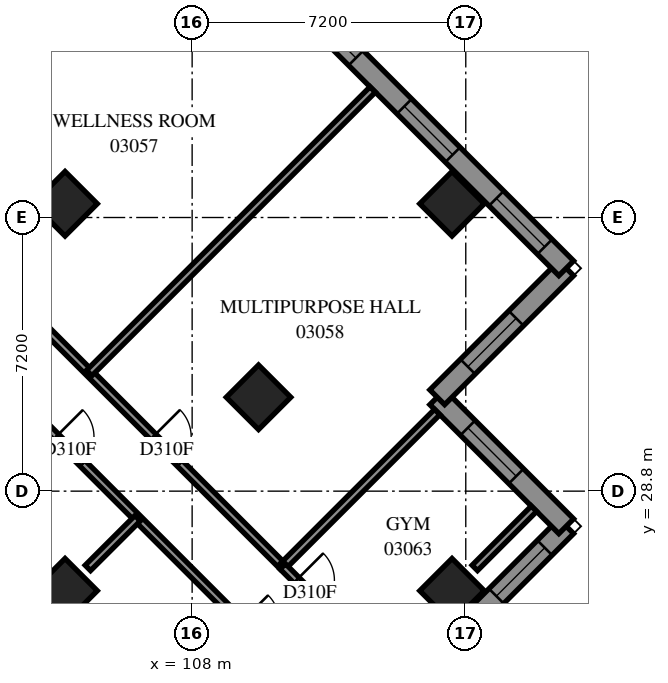
"""IFC4 building model, lengths in metres.
Left out: names, types, materials, properties, quantities, classifications, styles, units other than length and angle.
Written with IfcOpenShell. Run it as: python <this file> out.ifc"""

import sys

from ifc_helpers import new_model, si_unit, direction, frame, frame_2d, origin, origin_2d, place, context, subcontext, project, spatial, polyline, rectangle, outline, extrude, element, fill, save


model = new_model("IFC4")
c1 = context("Model", 3, precision=1e-05, world=origin(), true_north=direction((0.0, 1.0)))
c2 = subcontext(c1, "Body", "Model", "MODEL_VIEW")
j1 = project(units=[si_unit("LENGTHUNIT", "METRE"), si_unit("PLANEANGLEUNIT", "RADIAN")], contexts=[c1])
p1 = place(None, origin())
s1 = spatial("IfcSite", under=j1, at=p1, CompositionType="ELEMENT")
p2 = place(p1, origin())
s2 = spatial("IfcBuilding", under=s1, at=p2, CompositionType="ELEMENT")
p3 = place(p2, frame((0.0, 0.0, 14.4)))
s3 = spatial("IfcBuildingStorey", under=s2, at=p3, CompositionType="ELEMENT", Elevation=14.4)
for number, where, z_axis, x_axis in (
    (1, (104.656, 36.362, 0.0), (0.0, 0.0, 1.0), (0.707, -0.707, 0.0)),
    (2, (114.838, 36.362, 0.0), (0.0, 0.0, 1.0), (0.707, -0.707, 0.0)),
    (3, (109.747, 31.271, 0.0), (0.0, 0.0, 1.0), (0.707, -0.707, 0.0)),
    (4, (104.656, 26.18, 0.0), (0.0, 0.0, 1.0), (0.707, -0.707, 0.0)),
    (5, (114.838, 26.18, 0.0), (0.0, 0.0, 1.0), (0.707, -0.707, 0.0)),
):
    element("IfcColumn", number, at=place(p3, frame(where, z_axis=z_axis, x_axis=x_axis)), inside=s3, PredefinedType="COLUMN", context=c2, shape_type="SweptSolid", body=[
        extrude(rectangle(XDim=1.2, YDim=1.2, at=origin_2d()), origin(), (0.0, 0.0, 1.0), 3.8),
    ])
p4 = place(p3, frame((104.656, 14.689, 0.0), z_axis=(0.0, 0.0, 1.0), x_axis=(0.7071094621, 0.7071041002, 0.0)))
e6 = element("IfcWall", 6, at=p4, inside=s3, PredefinedType="SOLIDWALL", context=c2, shape_type="SweptSolid", body=[
    extrude(outline(polyline([(-0.275, -0.275), (18.925, -0.275), (18.375, 0.275), (0.275, 0.275), (-0.275, -0.275)])), origin(), (0.0, 0.0, 1.0), 3.8),
])
p5 = place(p4, frame((1.825, 0.0, 0.7)))
e7 = element("IfcOpeningElement", 7, at=p5, cuts=e6, PredefinedType="OPENING", context=c2, shape_type="SweptSolid", body=[
    extrude(rectangle(XDim=1.8, YDim=2.6, at=frame_2d((0.9, 1.3))), frame((0.0, 0.285, 0.0), z_axis=(0.0, -1.0, 0.0), x_axis=(1.0, 0.0, 0.0)), (0.0, 0.0, 1.0), 0.57),
])
p6 = place(p4, frame((5.425, 0.0, 0.7)))
e8 = element("IfcOpeningElement", 8, at=p6, cuts=e6, PredefinedType="OPENING", context=c2, shape_type="SweptSolid", body=[
    extrude(rectangle(XDim=1.8, YDim=2.6, at=frame_2d((0.9, 1.3))), frame((0.0, 0.285, 0.0), z_axis=(0.0, -1.0, 0.0), x_axis=(1.0, 0.0, 0.0)), (0.0, 0.0, 1.0), 0.57),
])
p7 = place(p4, frame((8.875, 0.0, 0.7)))
e9 = element("IfcOpeningElement", 9, at=p7, cuts=e6, PredefinedType="OPENING", context=c2, shape_type="SweptSolid", body=[
    extrude(rectangle(XDim=1.8, YDim=2.6, at=frame_2d((0.9, 1.3))), frame((0.0, 0.285, 0.0), z_axis=(0.0, -1.0, 0.0), x_axis=(1.0, 0.0, 0.0)), (0.0, 0.0, 1.0), 0.57),
])
p8 = place(p4, frame((12.775, 0.0, 0.7)))
e10 = element("IfcOpeningElement", 10, at=p8, cuts=e6, PredefinedType="OPENING", context=c2, shape_type="SweptSolid", body=[
    extrude(rectangle(XDim=1.8, YDim=2.6, at=frame_2d((0.9, 1.3))), frame((0.0, 0.285, 0.0), z_axis=(0.0, -1.0, 0.0), x_axis=(1.0, 0.0, 0.0)), (0.0, 0.0, 1.0), 0.57),
])
p9 = place(p4, frame((16.05, 0.0, 0.7)))
e11 = element("IfcOpeningElement", 11, at=p9, cuts=e6, PredefinedType="OPENING", context=c2, shape_type="SweptSolid", body=[
    extrude(rectangle(XDim=1.8, YDim=2.6, at=frame_2d((0.9, 1.3))), frame((0.0, 0.285, 0.0), z_axis=(0.0, -1.0, 0.0), x_axis=(1.0, 0.0, 0.0)), (0.0, 0.0, 1.0), 0.57),
])
p10 = place(p3, frame((117.843, 27.877, 0.0), z_axis=(0.0, 0.0, 1.0), x_axis=(-0.7071067812, 0.7071067812, 0.0)))
e12 = element("IfcWall", 12, at=p10, inside=s3, PredefinedType="SOLIDWALL", context=c2, shape_type="SweptSolid", body=[
    extrude(outline(polyline([(-0.275, -0.275), (4.525, -0.275), (5.075, 0.275), (0.275, 0.275), (-0.275, -0.275)])), origin(), (0.0, 0.0, 1.0), 3.8),
])
p11 = place(p10, frame((1.863, 0.0, 0.7)))
e13 = element("IfcOpeningElement", 13, at=p11, cuts=e12, PredefinedType="OPENING", context=c2, shape_type="SweptSolid", body=[
    extrude(rectangle(XDim=1.8, YDim=2.6, at=frame_2d((0.9, 1.3))), frame((0.0, 0.285, 0.0), z_axis=(0.0, -1.0, 0.0), x_axis=(1.0, 0.0, 0.0)), (0.0, 0.0, 1.0), 0.57),
])
p12 = place(p3, frame((114.449, 31.271, 0.0), z_axis=(0.0, 0.0, 1.0), x_axis=(0.7070963646, 0.7071171977, 0.0)))
e14 = element("IfcWall", 14, at=p12, inside=s3, PredefinedType="SOLIDWALL", context=c2, shape_type="SweptSolid", body=[
    extrude(outline(polyline([(0.275, -0.275), (5.075, -0.275), (4.525, 0.275), (-0.275, 0.275), (0.275, -0.275)])), origin(), (0.0, 0.0, 1.0), 3.8),
])
p13 = place(p12, frame((1.137, 0.0, 0.7)))
e15 = element("IfcOpeningElement", 15, at=p13, cuts=e14, PredefinedType="OPENING", context=c2, shape_type="SweptSolid", body=[
    extrude(rectangle(XDim=1.8, YDim=2.6, at=frame_2d((0.9, 1.3))), frame((0.0, 0.285, 0.0), z_axis=(0.0, -1.0, 0.0), x_axis=(1.0, 0.0, 0.0)), (0.0, 0.0, 1.0), 0.57),
])
p14 = place(p3, frame((117.843, 34.665, 0.0), z_axis=(0.0, 0.0, 1.0), x_axis=(-0.7071067812, 0.7071067812, 0.0)))
e16 = element("IfcWall", 16, at=p14, inside=s3, PredefinedType="SOLIDWALL", context=c2, shape_type="SweptSolid", body=[
    extrude(outline(polyline([(-0.275, -0.275), (54.222, -0.275), (53.994, 0.275), (0.275, 0.275), (-0.275, -0.275)])), origin(), (0.0, 0.0, 1.0), 3.8),
])
p15 = place(p14, frame((0.8, 0.0, 0.7)))
e17 = element("IfcOpeningElement", 17, at=p15, cuts=e16, PredefinedType="OPENING", context=c2, shape_type="SweptSolid", body=[
    extrude(rectangle(XDim=1.8, YDim=2.6, at=frame_2d((0.9, 1.3))), frame((0.0, 0.285, 0.0), z_axis=(0.0, -1.0, 0.0), x_axis=(1.0, 0.0, 0.0)), (0.0, 0.0, 1.0), 0.57),
])
p16 = place(p14, frame((4.225, 0.0, 0.7)))
e18 = element("IfcOpeningElement", 18, at=p16, cuts=e16, PredefinedType="OPENING", context=c2, shape_type="SweptSolid", body=[
    extrude(rectangle(XDim=1.8, YDim=2.6, at=frame_2d((0.9, 1.3))), frame((0.0, 0.285, 0.0), z_axis=(0.0, -1.0, 0.0), x_axis=(1.0, 0.0, 0.0)), (0.0, 0.0, 1.0), 0.57),
])
p17 = place(p14, frame((7.825, 0.0, 0.7)))
e19 = element("IfcOpeningElement", 19, at=p17, cuts=e16, PredefinedType="OPENING", context=c2, shape_type="SweptSolid", body=[
    extrude(rectangle(XDim=1.8, YDim=2.6, at=frame_2d((0.9, 1.3))), frame((0.0, 0.285, 0.0), z_axis=(0.0, -1.0, 0.0), x_axis=(1.0, 0.0, 0.0)), (0.0, 0.0, 1.0), 0.57),
])
p18 = place(p14, frame((11.425, 0.0, 0.7)))
e20 = element("IfcOpeningElement", 20, at=p18, cuts=e16, PredefinedType="OPENING", context=c2, shape_type="SweptSolid", body=[
    extrude(rectangle(XDim=1.8, YDim=2.6, at=frame_2d((0.9, 1.3))), frame((0.0, 0.285, 0.0), z_axis=(0.0, -1.0, 0.0), x_axis=(1.0, 0.0, 0.0)), (0.0, 0.0, 1.0), 0.57),
])
p19 = place(p14, frame((15.025, 0.0, 0.7)))
e21 = element("IfcOpeningElement", 21, at=p19, cuts=e16, PredefinedType="OPENING", context=c2, shape_type="SweptSolid", body=[
    extrude(rectangle(XDim=1.8, YDim=2.6, at=frame_2d((0.9, 1.3))), frame((0.0, 0.285, 0.0), z_axis=(0.0, -1.0, 0.0), x_axis=(1.0, 0.0, 0.0)), (0.0, 0.0, 1.0), 0.57),
])
p20 = place(p14, frame((18.625, 0.0, 0.7)))
e22 = element("IfcOpeningElement", 22, at=p20, cuts=e16, PredefinedType="OPENING", context=c2, shape_type="SweptSolid", body=[
    extrude(rectangle(XDim=1.8, YDim=2.6, at=frame_2d((0.9, 1.3))), frame((0.0, 0.285, 0.0), z_axis=(0.0, -1.0, 0.0), x_axis=(1.0, 0.0, 0.0)), (0.0, 0.0, 1.0), 0.57),
])
p21 = place(p14, frame((22.225, 0.0, 0.7)))
e23 = element("IfcOpeningElement", 23, at=p21, cuts=e16, PredefinedType="OPENING", context=c2, shape_type="SweptSolid", body=[
    extrude(rectangle(XDim=1.8, YDim=2.6, at=frame_2d((0.9, 1.3))), frame((0.0, 0.285, 0.0), z_axis=(0.0, -1.0, 0.0), x_axis=(1.0, 0.0, 0.0)), (0.0, 0.0, 1.0), 0.57),
])
p22 = place(p14, frame((25.825, 0.0, 0.7)))
e24 = element("IfcOpeningElement", 24, at=p22, cuts=e16, PredefinedType="OPENING", context=c2, shape_type="SweptSolid", body=[
    extrude(rectangle(XDim=1.8, YDim=2.6, at=frame_2d((0.9, 1.3))), frame((0.0, 0.285, 0.0), z_axis=(0.0, -1.0, 0.0), x_axis=(1.0, 0.0, 0.0)), (0.0, 0.0, 1.0), 0.57),
])
p23 = place(p14, frame((29.425, 0.0, 0.7)))
e25 = element("IfcOpeningElement", 25, at=p23, cuts=e16, PredefinedType="OPENING", context=c2, shape_type="SweptSolid", body=[
    extrude(rectangle(XDim=1.8, YDim=2.6, at=frame_2d((0.9, 1.3))), frame((0.0, 0.285, 0.0), z_axis=(0.0, -1.0, 0.0), x_axis=(1.0, 0.0, 0.0)), (0.0, 0.0, 1.0), 0.57),
])
p24 = place(p14, frame((33.025, 0.0, 0.7)))
e26 = element("IfcOpeningElement", 26, at=p24, cuts=e16, PredefinedType="OPENING", context=c2, shape_type="SweptSolid", body=[
    extrude(rectangle(XDim=1.8, YDim=2.6, at=frame_2d((0.9, 1.3))), frame((0.0, 0.285, 0.0), z_axis=(0.0, -1.0, 0.0), x_axis=(1.0, 0.0, 0.0)), (0.0, 0.0, 1.0), 0.57),
])
p25 = place(p14, frame((36.625, 0.0, 0.7)))
e27 = element("IfcOpeningElement", 27, at=p25, cuts=e16, PredefinedType="OPENING", context=c2, shape_type="SweptSolid", body=[
    extrude(rectangle(XDim=1.8, YDim=2.6, at=frame_2d((0.9, 1.3))), frame((0.0, 0.285, 0.0), z_axis=(0.0, -1.0, 0.0), x_axis=(1.0, 0.0, 0.0)), (0.0, 0.0, 1.0), 0.57),
])
p26 = place(p14, frame((40.225, 0.0, 0.7)))
e28 = element("IfcOpeningElement", 28, at=p26, cuts=e16, PredefinedType="OPENING", context=c2, shape_type="SweptSolid", body=[
    extrude(rectangle(XDim=1.8, YDim=2.6, at=frame_2d((0.9, 1.3))), frame((0.0, 0.285, 0.0), z_axis=(0.0, -1.0, 0.0), x_axis=(1.0, 0.0, 0.0)), (0.0, 0.0, 1.0), 0.57),
])
p27 = place(p14, frame((43.825, 0.0, 0.7)))
e29 = element("IfcOpeningElement", 29, at=p27, cuts=e16, PredefinedType="OPENING", context=c2, shape_type="SweptSolid", body=[
    extrude(rectangle(XDim=1.8, YDim=2.6, at=frame_2d((0.9, 1.3))), frame((0.0, 0.285, 0.0), z_axis=(0.0, -1.0, 0.0), x_axis=(1.0, 0.0, 0.0)), (0.0, 0.0, 1.0), 0.57),
])
p28 = place(p14, frame((47.425, 0.0, 0.7)))
e30 = element("IfcOpeningElement", 30, at=p28, cuts=e16, PredefinedType="OPENING", context=c2, shape_type="SweptSolid", body=[
    extrude(rectangle(XDim=1.8, YDim=2.6, at=frame_2d((0.9, 1.3))), frame((0.0, 0.285, 0.0), z_axis=(0.0, -1.0, 0.0), x_axis=(1.0, 0.0, 0.0)), (0.0, 0.0, 1.0), 0.57),
])
p29 = place(p14, frame((51.06, 0.0, 0.7)))
e31 = element("IfcOpeningElement", 31, at=p29, cuts=e16, PredefinedType="OPENING", context=c2, shape_type="SweptSolid", body=[
    extrude(rectangle(XDim=1.8, YDim=2.6, at=frame_2d((0.9, 1.3))), frame((0.0, 0.285, 0.0), z_axis=(0.0, -1.0, 0.0), x_axis=(1.0, 0.0, 0.0)), (0.0, 0.0, 1.0), 0.57),
])
p30 = place(p3, frame((77.07, 42.275, 0.0), z_axis=(0.0, 0.0, 1.0), x_axis=(0.7071067812, -0.7071067812, 0.0)))
e32 = element("IfcWall", 32, at=p30, inside=s3, PredefinedType="SOLIDWALL", context=c2, shape_type="SweptSolid", body=[
    extrude(outline(polyline([(0.114, -0.275), (39.288, -0.275), (38.737, 0.275), (-0.114, 0.275), (0.114, -0.275)])), origin(), (0.0, 0.0, 1.0), 3.8),
])
p31 = place(p30, frame((2.837, 0.0, 0.7)))
e33 = element("IfcOpeningElement", 33, at=p31, cuts=e32, PredefinedType="OPENING", context=c2, shape_type="SweptSolid", body=[
    extrude(rectangle(XDim=1.8, YDim=2.6, at=frame_2d((0.9, 1.3))), frame((0.0, 0.285, 0.0), z_axis=(0.0, -1.0, 0.0), x_axis=(1.0, 0.0, 0.0)), (0.0, 0.0, 1.0), 0.57),
])
p32 = place(p30, frame((6.588, 0.0, 0.7)))
e34 = element("IfcOpeningElement", 34, at=p32, cuts=e32, PredefinedType="OPENING", context=c2, shape_type="SweptSolid", body=[
    extrude(rectangle(XDim=1.8, YDim=2.6, at=frame_2d((0.9, 1.3))), frame((0.0, 0.285, 0.0), z_axis=(0.0, -1.0, 0.0), x_axis=(1.0, 0.0, 0.0)), (0.0, 0.0, 1.0), 0.57),
])
p33 = place(p30, frame((10.188, 0.0, 0.7)))
e35 = element("IfcOpeningElement", 35, at=p33, cuts=e32, PredefinedType="OPENING", context=c2, shape_type="SweptSolid", body=[
    extrude(rectangle(XDim=1.8, YDim=2.6, at=frame_2d((0.9, 1.3))), frame((0.0, 0.285, 0.0), z_axis=(0.0, -1.0, 0.0), x_axis=(1.0, 0.0, 0.0)), (0.0, 0.0, 1.0), 0.57),
])
p34 = place(p30, frame((13.787, 0.0, 0.7)))
e36 = element("IfcOpeningElement", 36, at=p34, cuts=e32, PredefinedType="OPENING", context=c2, shape_type="SweptSolid", body=[
    extrude(rectangle(XDim=1.8, YDim=2.6, at=frame_2d((0.9, 1.3))), frame((0.0, 0.285, 0.0), z_axis=(0.0, -1.0, 0.0), x_axis=(1.0, 0.0, 0.0)), (0.0, 0.0, 1.0), 0.57),
])
p35 = place(p30, frame((17.387, 0.0, 0.7)))
e37 = element("IfcOpeningElement", 37, at=p35, cuts=e32, PredefinedType="OPENING", context=c2, shape_type="SweptSolid", body=[
    extrude(rectangle(XDim=1.8, YDim=2.6, at=frame_2d((0.9, 1.3))), frame((0.0, 0.285, 0.0), z_axis=(0.0, -1.0, 0.0), x_axis=(1.0, 0.0, 0.0)), (0.0, 0.0, 1.0), 0.57),
])
p36 = place(p30, frame((20.988, 0.0, 0.7)))
e38 = element("IfcOpeningElement", 38, at=p36, cuts=e32, PredefinedType="OPENING", context=c2, shape_type="SweptSolid", body=[
    extrude(rectangle(XDim=1.8, YDim=2.6, at=frame_2d((0.9, 1.3))), frame((0.0, 0.285, 0.0), z_axis=(0.0, -1.0, 0.0), x_axis=(1.0, 0.0, 0.0)), (0.0, 0.0, 1.0), 0.57),
])
p37 = place(p30, frame((24.587, 0.0, 0.7)))
e39 = element("IfcOpeningElement", 39, at=p37, cuts=e32, PredefinedType="OPENING", context=c2, shape_type="SweptSolid", body=[
    extrude(rectangle(XDim=1.8, YDim=2.6, at=frame_2d((0.9, 1.3))), frame((0.0, 0.285, 0.0), z_axis=(0.0, -1.0, 0.0), x_axis=(1.0, 0.0, 0.0)), (0.0, 0.0, 1.0), 0.57),
])
p38 = place(p30, frame((28.188, 0.0, 0.7)))
e40 = element("IfcOpeningElement", 40, at=p38, cuts=e32, PredefinedType="OPENING", context=c2, shape_type="SweptSolid", body=[
    extrude(rectangle(XDim=1.8, YDim=2.6, at=frame_2d((0.9, 1.3))), frame((0.0, 0.285, 0.0), z_axis=(0.0, -1.0, 0.0), x_axis=(1.0, 0.0, 0.0)), (0.0, 0.0, 1.0), 0.57),
])
p39 = place(p30, frame((31.788, 0.0, 0.7)))
e41 = element("IfcOpeningElement", 41, at=p39, cuts=e32, PredefinedType="OPENING", context=c2, shape_type="SweptSolid", body=[
    extrude(rectangle(XDim=1.8, YDim=2.6, at=frame_2d((0.9, 1.3))), frame((0.0, 0.285, 0.0), z_axis=(0.0, -1.0, 0.0), x_axis=(1.0, 0.0, 0.0)), (0.0, 0.0, 1.0), 0.57),
])
p40 = place(p30, frame((35.388, 0.0, 0.7)))
e42 = element("IfcOpeningElement", 42, at=p40, cuts=e32, PredefinedType="OPENING", context=c2, shape_type="SweptSolid", body=[
    extrude(rectangle(XDim=1.8, YDim=2.6, at=frame_2d((0.9, 1.3))), frame((0.0, 0.285, 0.0), z_axis=(0.0, -1.0, 0.0), x_axis=(1.0, 0.0, 0.0)), (0.0, 0.0, 1.0), 0.57),
])
p41 = place(p3, frame((93.835, 40.813, 0.0), z_axis=(0.0, 0.0, 1.0), x_axis=(0.7071067812, -0.7071067812, 0.0)))
e43 = element("IfcWall", 43, at=p41, inside=s3, PredefinedType="PARTITIONING", context=c2, shape_type="SweptSolid", body=[
    extrude(rectangle(XDim=25.198, YDim=0.2, at=frame_2d((12.599, 0.0))), origin(), (0.0, 0.0, 1.0), 3.8),
])
p42 = place(p41, frame((2.337, 0.0, 0.0)))
e44 = element("IfcOpeningElement", 44, at=p42, cuts=e43, PredefinedType="OPENING", context=c2, shape_type="SweptSolid", body=[
    extrude(rectangle(XDim=1.0, YDim=2.1, at=frame_2d((0.5, 1.05))), frame((0.0, 0.11, 0.0), z_axis=(0.0, -1.0, 0.0), x_axis=(1.0, 0.0, 0.0)), (0.0, 0.0, 1.0), 0.22),
])
p43 = place(p41, frame((9.537, 0.0, 0.0)))
e45 = element("IfcOpeningElement", 45, at=p43, cuts=e43, PredefinedType="OPENING", context=c2, shape_type="SweptSolid", body=[
    extrude(rectangle(XDim=1.0, YDim=2.1, at=frame_2d((0.5, 1.05))), frame((0.0, 0.11, 0.0), z_axis=(0.0, -1.0, 0.0), x_axis=(1.0, 0.0, 0.0)), (0.0, 0.0, 1.0), 0.22),
])
p44 = place(p41, frame((14.966, 0.0, 0.0)))
e46 = element("IfcOpeningElement", 46, at=p44, cuts=e43, PredefinedType="OPENING", context=c2, shape_type="SweptSolid", body=[
    extrude(rectangle(XDim=1.0, YDim=2.1, at=frame_2d((0.5, 1.05))), frame((0.0, 0.11, 0.0), z_axis=(0.0, -1.0, 0.0), x_axis=(1.0, 0.0, 0.0)), (0.0, 0.0, 1.0), 0.22),
])
p45 = place(p41, frame((21.861, 0.0, 0.0)))
e47 = element("IfcOpeningElement", 47, at=p45, cuts=e43, PredefinedType="OPENING", context=c2, shape_type="SweptSolid", body=[
    extrude(rectangle(XDim=1.0, YDim=2.1, at=frame_2d((0.5, 1.05))), frame((0.0, 0.11, 0.0), z_axis=(0.0, -1.0, 0.0), x_axis=(1.0, 0.0, 0.0)), (0.0, 0.0, 1.0), 0.22),
])
p46 = place(p3, frame((94.689, 42.517, 0.0), z_axis=(0.0, 0.0, 1.0), x_axis=(0.7071067812, -0.7071067812, 0.0)))
e48 = element("IfcWall", 48, at=p46, inside=s3, PredefinedType="PARTITIONING", context=c2, shape_type="SweptSolid", body=[
    extrude(rectangle(XDim=22.2, YDim=0.2, at=frame_2d((11.1, 0.0))), origin(), (0.0, 0.0, 1.0), 3.8),
])
p47 = place(p46, frame((2.974, 0.0, 0.0)))
e49 = element("IfcOpeningElement", 49, at=p47, cuts=e48, PredefinedType="OPENING", context=c2, shape_type="SweptSolid", body=[
    extrude(rectangle(XDim=1.0, YDim=2.1, at=frame_2d((0.5, 1.05))), frame((0.0, 0.11, 0.0), z_axis=(0.0, -1.0, 0.0), x_axis=(1.0, 0.0, 0.0)), (0.0, 0.0, 1.0), 0.22),
])
p48 = place(p46, frame((10.174, 0.0, 0.0)))
e50 = element("IfcOpeningElement", 50, at=p48, cuts=e48, PredefinedType="OPENING", context=c2, shape_type="SweptSolid", body=[
    extrude(rectangle(XDim=1.0, YDim=2.1, at=frame_2d((0.5, 1.05))), frame((0.0, 0.11, 0.0), z_axis=(0.0, -1.0, 0.0), x_axis=(1.0, 0.0, 0.0)), (0.0, 0.0, 1.0), 0.22),
])
p49 = place(p46, frame((17.374, 0.0, 0.0)))
e51 = element("IfcOpeningElement", 51, at=p49, cuts=e48, PredefinedType="OPENING", context=c2, shape_type="SweptSolid", body=[
    extrude(rectangle(XDim=1.0, YDim=2.1, at=frame_2d((0.5, 1.05))), frame((0.0, 0.11, 0.0), z_axis=(0.0, -1.0, 0.0), x_axis=(1.0, 0.0, 0.0)), (0.0, 0.0, 1.0), 0.22),
])
for number, where, z_axis, x_axis in (
    (52, (105.292, 31.908, 0.0), (0.0, 0.0, 1.0), (0.707, 0.707, 0.0)),
    (53, (100.201, 36.999, 0.0), (0.0, 0.0, 1.0), (0.707, 0.707, 0.0)),
):
    element("IfcWall", number, at=place(p3, frame(where, z_axis=z_axis, x_axis=x_axis)), inside=s3, PredefinedType="PARTITIONING", context=c2, shape_type="SweptSolid", body=[
        extrude(rectangle(XDim=10.55, YDim=0.2, at=frame_2d((5.275, 0.0))), origin(), (0.0, 0.0, 1.0), 3.8),
    ])
p50 = place(p3, frame((110.383, 26.817, 0.0), z_axis=(0.0, 0.0, 1.0), x_axis=(0.7071067812, 0.7071067812, 0.0)))
e54 = element("IfcWall", 54, at=p50, inside=s3, PredefinedType="PARTITIONING", context=c2, shape_type="SweptSolid", body=[
    extrude(rectangle(XDim=5.75, YDim=0.2, at=frame_2d((2.875, 0.0))), origin(), (0.0, 0.0, 1.0), 3.8),
])
p51 = place(p3, frame((110.385, 26.817, 0.0), z_axis=(0.0, 0.0, 1.0), x_axis=(0.7068288851, -0.7073845681, 0.0)))
e55 = element("IfcWall", 55, at=p51, inside=s3, PredefinedType="PARTITIONING", context=c2, shape_type="SweptSolid", body=[
    extrude(rectangle(XDim=3.599, YDim=0.2, at=frame_2d((1.8, 0.0))), origin(), (0.0, 0.0, 1.0), 3.8),
])
p52 = place(p51, frame((0.507, 0.0, 0.0)))
e56 = element("IfcOpeningElement", 56, at=p52, cuts=e55, PredefinedType="OPENING", context=c2, shape_type="SweptSolid", body=[
    extrude(rectangle(XDim=1.0, YDim=2.1, at=frame_2d((0.5, 1.05))), frame((0.0, 0.11, 0.0), z_axis=(0.0, -1.0, 0.0), x_axis=(1.0, 0.0, 0.0)), (0.0, 0.0, 1.0), 0.22),
])
p53 = place(p3, frame((115.438, 26.78, 0.0), z_axis=(0.0, 0.0, 1.0), x_axis=(0.7071067812, 0.7071067812, 0.0)))
e57 = element("IfcWall", 57, at=p53, inside=s3, PredefinedType="PARTITIONING", context=c2, shape_type="SweptSolid", body=[
    extrude(rectangle(XDim=2.201, YDim=0.2, at=frame_2d((1.101, 0.0))), origin(), (0.0, 0.0, 1.0), 3.8),
])
p54 = place(p3, frame((105.256, 26.78, 0.0), z_axis=(0.0, 0.0, 1.0), x_axis=(0.7076467632, 0.7065663865, 0.0)))
e58 = element("IfcWall", 58, at=p54, inside=s3, PredefinedType="PARTITIONING", context=c2, shape_type="SweptSolid", body=[
    extrude(rectangle(XDim=1.851, YDim=0.2, at=frame_2d((0.926, 0.0))), origin(), (0.0, 0.0, 1.0), 3.8),
])
p55 = place(p9, origin())
e59 = element("IfcWindow", 59, at=p55, inside=s3, PartitioningType="SINGLE_PANEL", PredefinedType="WINDOW", context=c2, shape_type="SweptSolid", body=[
    extrude(rectangle(XDim=1.8, YDim=2.6, at=frame_2d((0.9, 1.3))), frame((0.0, 0.155, 0.0), z_axis=(0.0, -1.0, 0.0), x_axis=(1.0, 0.0, 0.0)), (0.0, 0.0, 1.0), 0.06),
])
fill(e11, e59)
p56 = place(p11, origin())
e60 = element("IfcWindow", 60, at=p56, inside=s3, PartitioningType="SINGLE_PANEL", PredefinedType="WINDOW", context=c2, shape_type="SweptSolid", body=[
    extrude(rectangle(XDim=1.8, YDim=2.6, at=frame_2d((0.9, 1.3))), frame((0.0, 0.155, 0.0), z_axis=(0.0, -1.0, 0.0), x_axis=(1.0, 0.0, 0.0)), (0.0, 0.0, 1.0), 0.06),
])
fill(e13, e60)
p57 = place(p13, origin())
e61 = element("IfcWindow", 61, at=p57, inside=s3, PartitioningType="SINGLE_PANEL", PredefinedType="WINDOW", context=c2, shape_type="SweptSolid", body=[
    extrude(rectangle(XDim=1.8, YDim=2.6, at=frame_2d((0.9, 1.3))), frame((0.0, 0.155, 0.0), z_axis=(0.0, -1.0, 0.0), x_axis=(1.0, 0.0, 0.0)), (0.0, 0.0, 1.0), 0.06),
])
fill(e15, e61)
p58 = place(p15, origin())
e62 = element("IfcWindow", 62, at=p58, inside=s3, PartitioningType="SINGLE_PANEL", PredefinedType="WINDOW", context=c2, shape_type="SweptSolid", body=[
    extrude(rectangle(XDim=1.8, YDim=2.6, at=frame_2d((0.9, 1.3))), frame((0.0, 0.155, 0.0), z_axis=(0.0, -1.0, 0.0), x_axis=(1.0, 0.0, 0.0)), (0.0, 0.0, 1.0), 0.06),
])
fill(e17, e62)
p59 = place(p16, origin())
e63 = element("IfcWindow", 63, at=p59, inside=s3, PartitioningType="SINGLE_PANEL", PredefinedType="WINDOW", context=c2, shape_type="SweptSolid", body=[
    extrude(rectangle(XDim=1.8, YDim=2.6, at=frame_2d((0.9, 1.3))), frame((0.0, 0.155, 0.0), z_axis=(0.0, -1.0, 0.0), x_axis=(1.0, 0.0, 0.0)), (0.0, 0.0, 1.0), 0.06),
])
fill(e18, e63)
p60 = place(p17, origin())
e64 = element("IfcWindow", 64, at=p60, inside=s3, PartitioningType="SINGLE_PANEL", PredefinedType="WINDOW", context=c2, shape_type="SweptSolid", body=[
    extrude(rectangle(XDim=1.8, YDim=2.6, at=frame_2d((0.9, 1.3))), frame((0.0, 0.155, 0.0), z_axis=(0.0, -1.0, 0.0), x_axis=(1.0, 0.0, 0.0)), (0.0, 0.0, 1.0), 0.06),
])
fill(e19, e64)
p61 = place(p49, origin())
e65 = element("IfcDoor", 65, at=p61, inside=s3, OperationType="SINGLE_SWING_RIGHT", PredefinedType="DOOR", context=c2, shape_type="SweptSolid", body=[
    extrude(rectangle(XDim=1.0, YDim=2.1, at=frame_2d((0.5, 1.05))), frame((0.0, 0.025, 0.0), z_axis=(0.0, -1.0, 0.0), x_axis=(1.0, 0.0, 0.0)), (0.0, 0.0, 1.0), 0.05),
])
fill(e51, e65)
p62 = place(p44, origin())
e66 = element("IfcDoor", 66, at=p62, inside=s3, OperationType="SINGLE_SWING_LEFT", PredefinedType="DOOR", context=c2, shape_type="SweptSolid", body=[
    extrude(rectangle(XDim=1.0, YDim=2.1, at=frame_2d((0.5, 1.05))), frame((0.0, 0.025, 0.0), z_axis=(0.0, -1.0, 0.0), x_axis=(1.0, 0.0, 0.0)), (0.0, 0.0, 1.0), 0.05),
])
fill(e46, e66)
p63 = place(p52, origin())
e67 = element("IfcDoor", 67, at=p63, inside=s3, OperationType="SINGLE_SWING_RIGHT", PredefinedType="DOOR", context=c2, shape_type="SweptSolid", body=[
    extrude(rectangle(XDim=1.0, YDim=2.1, at=frame_2d((0.5, 1.05))), frame((0.0, 0.025, 0.0), z_axis=(0.0, -1.0, 0.0), x_axis=(1.0, 0.0, 0.0)), (0.0, 0.0, 1.0), 0.05),
])
fill(e56, e67)
save(model, sys.argv[1])
